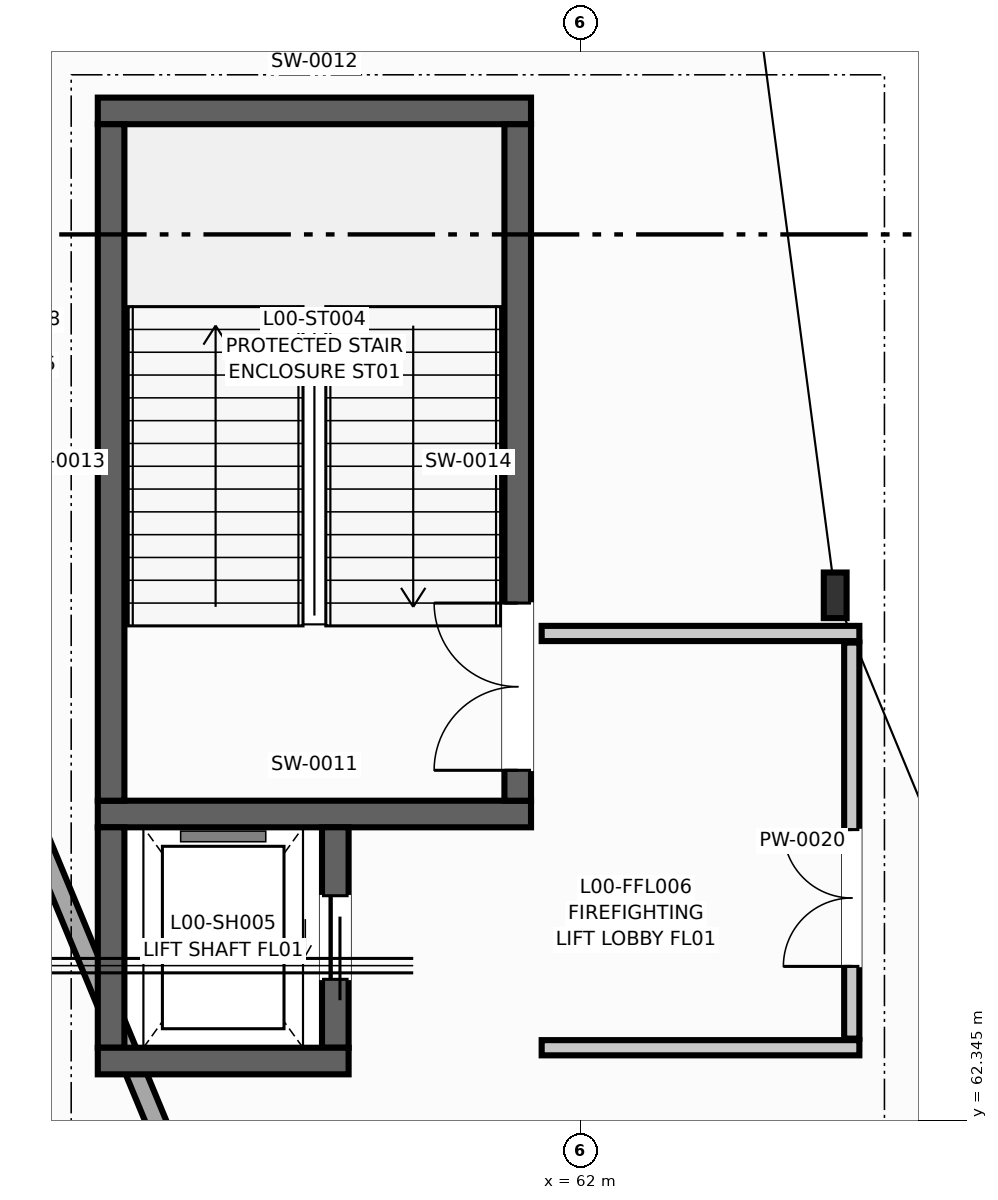
"""IFC4 building model, lengths in metres.
Left out: names, types, materials, properties, quantities, classifications, styles, units other than length and angle.
Written with IfcOpenShell. Run it as: python <this file> out.ifc"""

import sys

from ifc_helpers import new_model, si_unit, direction, frame, frame_2d, origin, origin_2d, place, context, subcontext, project, spatial, rectangle, i_section, extrude, element, fill, save


model = new_model("IFC4")
c1 = context("Model", 3, precision=1e-05, world=origin(), true_north=direction((0.0, 1.0)))
c2 = subcontext(c1, "Body", "Model", "MODEL_VIEW")
j1 = project(units=[si_unit("LENGTHUNIT", "METRE"), si_unit("PLANEANGLEUNIT", "RADIAN")], contexts=[c1])
p1 = place(None, origin())
s1 = spatial("IfcSite", under=j1, at=p1, CompositionType="ELEMENT")
p2 = place(p1, origin())
s2 = spatial("IfcBuilding", under=s1, at=p2, CompositionType="ELEMENT")
p3 = place(p2, origin())
s3 = spatial("IfcBuildingStorey", under=s2, at=p3, CompositionType="ELEMENT", Elevation=0.0)
p4 = place(p3, frame((65.352, 69.252, 0.0), z_axis=(0.0, 0.0, 1.0), x_axis=(1.0, 0.0, 0.0)))
e1 = element("IfcColumn", 1, at=p4, inside=s3, PredefinedType="COLUMN", context=c2, shape_type="SweptSolid", body=[
    extrude(i_section(OverallWidth=0.3, OverallDepth=0.6, WebThickness=0.015, FlangeThickness=0.03, at=origin_2d()), origin(), (0.0, 0.0, 1.0), 4.5),
])
p5 = place(p3, frame((54.727, 66.405, 0.0), z_axis=(0.0, 0.0, 1.0), x_axis=(0.382632655327, -0.923900563414, 0.0)))
e2 = element("IfcWall", 2, at=p5, inside=s3, PredefinedType="SOLIDWALL", context=c2, shape_type="SweptSolid", body=[
    extrude(rectangle(XDim=11.695, YDim=0.26, at=frame_2d((5.847, 0.0))), origin(), (0.0, 0.0, 1.0), 3.68),
])
p6 = place(p5, frame((4.948, 0.0, 0.0)))
e3 = element("IfcOpeningElement", 3, at=p6, cuts=e2, PredefinedType="OPENING", context=c2, shape_type="SweptSolid", body=[
    extrude(rectangle(XDim=1.8, YDim=2.35, at=frame_2d((0.9, 1.175))), frame((0.0, 0.14, 0.0), z_axis=(0.0, -1.0, 0.0), x_axis=(1.0, 0.0, 0.0)), (0.0, 0.0, 1.0), 0.28),
])
for number, where, z_axis, x_axis in (
    (4, (55.65, 66.375, 0.0), (0.0, 0.0, 1.0), (1.0, 0.0, 0.0)),
    (5, (55.65, 75.625, 0.0), (0.0, 0.0, 1.0), (1.0, 0.0, 0.0)),
):
    element("IfcWall", number, at=place(p3, frame(where, z_axis=z_axis, x_axis=x_axis)), inside=s3, PredefinedType="SHEAR", context=c2, shape_type="SweptSolid", body=[
        extrude(rectangle(XDim=5.7, YDim=0.35, at=frame_2d((2.85, 0.0))), origin(), (0.0, 0.0, 1.0), 4.225),
    ])
p7 = place(p3, frame((55.825, 66.55, 0.0), z_axis=(0.0, 0.0, 1.0), x_axis=(0.0, 1.0, 0.0)))
e6 = element("IfcWall", 6, at=p7, inside=s3, PredefinedType="SHEAR", context=c2, shape_type="SweptSolid", body=[
    extrude(rectangle(XDim=8.9, YDim=0.35, at=frame_2d((4.45, 0.0))), origin(), (0.0, 0.0, 1.0), 4.225),
])
p8 = place(p3, frame((61.175, 66.55, 0.0), z_axis=(0.0, 0.0, 1.0), x_axis=(0.0, 1.0, 0.0)))
e7 = element("IfcWall", 7, at=p8, inside=s3, PredefinedType="SHEAR", context=c2, shape_type="SweptSolid", body=[
    extrude(rectangle(XDim=8.9, YDim=0.35, at=frame_2d((4.45, 0.0))), origin(), (0.0, 0.0, 1.0), 4.225),
])
p9 = place(p8, frame((0.4, 0.0, 0.0)))
e8 = element("IfcOpeningElement", 8, at=p9, cuts=e7, PredefinedType="OPENING", context=c2, shape_type="SweptSolid", body=[
    extrude(rectangle(XDim=2.2, YDim=2.3, at=frame_2d((1.1, 1.15))), frame((0.0, 0.185, 0.0), z_axis=(0.0, -1.0, 0.0), x_axis=(1.0, 0.0, 0.0)), (0.0, 0.0, 1.0), 0.37),
])
p10 = place(p3, frame((55.825, 63.3, 0.0), z_axis=(0.0, 0.0, 1.0), x_axis=(0.0, 1.0, 0.0)))
e9 = element("IfcWall", 9, at=p10, inside=s3, PredefinedType="SHEAR", context=c2, shape_type="SweptSolid", body=[
    extrude(rectangle(XDim=2.9, YDim=0.35, at=frame_2d((1.45, 0.0))), origin(), (0.0, 0.0, 1.0), 4.225),
])
p11 = place(p3, frame((58.775, 63.3, 0.0), z_axis=(0.0, 0.0, 1.0), x_axis=(0.0, 1.0, 0.0)))
e10 = element("IfcWall", 10, at=p11, inside=s3, PredefinedType="SHEAR", context=c2, shape_type="SweptSolid", body=[
    extrude(rectangle(XDim=2.9, YDim=0.35, at=frame_2d((1.45, 0.0))), origin(), (0.0, 0.0, 1.0), 4.225),
])
p12 = place(p11, frame((0.9, 0.0, 0.0)))
e11 = element("IfcOpeningElement", 11, at=p12, cuts=e10, PredefinedType="OPENING", context=c2, shape_type="SweptSolid", body=[
    extrude(rectangle(XDim=1.1, YDim=2.2, at=frame_2d((0.55, 1.1))), frame((0.0, 0.185, 0.0), z_axis=(0.0, -1.0, 0.0), x_axis=(1.0, 0.0, 0.0)), (0.0, 0.0, 1.0), 0.37),
])
p13 = place(p3, frame((55.65, 63.125, 0.0), z_axis=(0.0, 0.0, 1.0), x_axis=(1.0, 0.0, 0.0)))
e12 = element("IfcWall", 12, at=p13, inside=s3, PredefinedType="SHEAR", context=c2, shape_type="SweptSolid", body=[
    extrude(rectangle(XDim=3.3, YDim=0.35, at=frame_2d((1.65, 0.0))), origin(), (0.0, 0.0, 1.0), 4.225),
])
for number, where, z_axis, x_axis in (
    (13, (61.49, 63.3, 0.0), (0.0, 0.0, 1.0), (1.0, 0.0, 0.0)),
    (14, (61.49, 68.75, 0.0), (0.0, 0.0, 1.0), (1.0, 0.0, 0.0)),
):
    element("IfcWall", number, at=place(p3, frame(where, z_axis=z_axis, x_axis=x_axis)), inside=s3, PredefinedType="PARTITIONING", context=c2, shape_type="SweptSolid", body=[
        extrude(rectangle(XDim=4.18, YDim=0.2, at=frame_2d((2.09, 0.0))), origin(), (0.0, 0.0, 1.0), 3.22),
    ])
p14 = place(p3, frame((65.57, 63.42, 0.0), z_axis=(0.0, 0.0, 1.0), x_axis=(0.0, 1.0, 0.0)))
e15 = element("IfcWall", 15, at=p14, inside=s3, PredefinedType="PARTITIONING", context=c2, shape_type="SweptSolid", body=[
    extrude(rectangle(XDim=5.21, YDim=0.2, at=frame_2d((2.605, 0.0))), origin(), (0.0, 0.0, 1.0), 3.22),
])
p15 = place(p14, frame((0.95, 0.0, 0.0)))
e16 = element("IfcOpeningElement", 16, at=p15, cuts=e15, PredefinedType="OPENING", context=c2, shape_type="SweptSolid", body=[
    extrude(rectangle(XDim=1.8, YDim=2.2, at=frame_2d((0.9, 1.1))), frame((0.0, 0.11, 0.0), z_axis=(0.0, -1.0, 0.0), x_axis=(1.0, 0.0, 0.0)), (0.0, 0.0, 1.0), 0.22),
])
p16 = place(p9, origin())
e17 = element("IfcDoor", 17, at=p16, inside=s3, OperationType="DOUBLE_DOOR_SINGLE_SWING", PredefinedType="DOOR", context=c2, shape_type="SweptSolid", body=[
    extrude(rectangle(XDim=2.2, YDim=2.3, at=frame_2d((1.1, 1.15))), frame((0.0, 0.025, 0.0), z_axis=(0.0, -1.0, 0.0), x_axis=(1.0, 0.0, 0.0)), (0.0, 0.0, 1.0), 0.05),
])
fill(e8, e17)
p17 = place(p12, origin())
e18 = element("IfcDoor", 18, at=p17, inside=s3, OperationType="SLIDING_TO_LEFT", PredefinedType="DOOR", context=c2, shape_type="SweptSolid", body=[
    extrude(rectangle(XDim=1.1, YDim=2.2, at=frame_2d((0.55, 1.1))), frame((0.0, 0.025, 0.0), z_axis=(0.0, -1.0, 0.0), x_axis=(1.0, 0.0, 0.0)), (0.0, 0.0, 1.0), 0.05),
])
fill(e11, e18)
p18 = place(p15, origin())
e19 = element("IfcDoor", 19, at=p18, inside=s3, OperationType="DOUBLE_DOOR_SINGLE_SWING", PredefinedType="DOOR", context=c2, shape_type="SweptSolid", body=[
    extrude(rectangle(XDim=1.8, YDim=2.2, at=frame_2d((0.9, 1.1))), frame((0.0, 0.025, 0.0), z_axis=(0.0, -1.0, 0.0), x_axis=(1.0, 0.0, 0.0)), (0.0, 0.0, 1.0), 0.05),
])
fill(e16, e19)
save(model, sys.argv[1])
